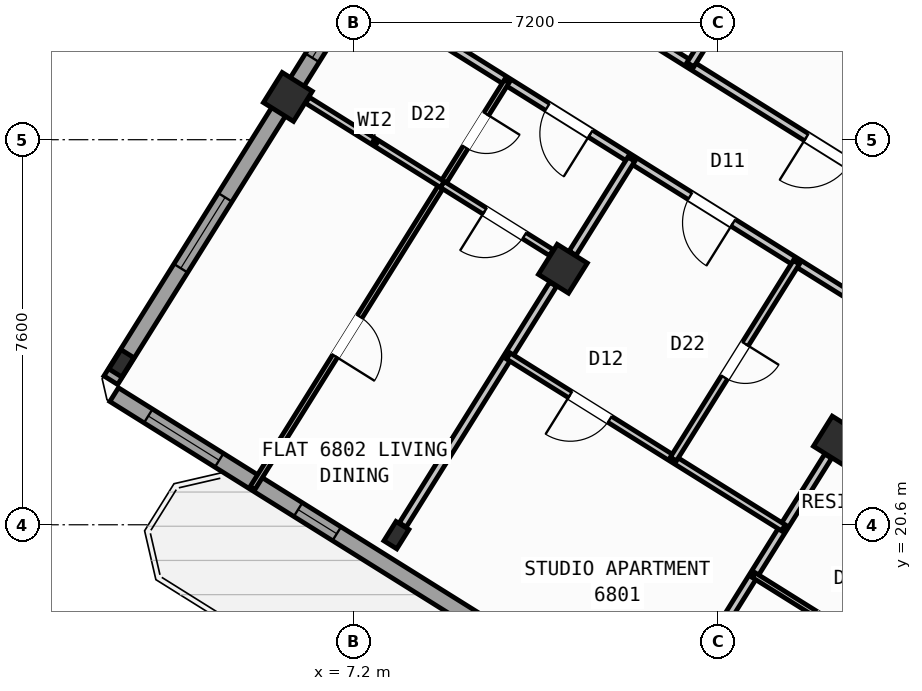
"""IFC4 building model, lengths in metres.
Left out: names, types, materials, properties, quantities, classifications, styles, units other than length and angle.
Written with IfcOpenShell. Run it as: python <this file> out.ifc"""

import sys

from ifc_helpers import new_model, si_unit, direction, frame, frame_2d, origin, origin_2d, place, context, subcontext, project, spatial, rectangle, hollow_rectangle, i_section, extrude, source, transform, mapped, element, fill, save


model = new_model("IFC4")
c1 = context("Model", 3, precision=1e-05, world=origin(), true_north=direction((0.0, 1.0)))
c2 = subcontext(c1, "Body", "Model", "MODEL_VIEW")
j1 = project(units=[si_unit("LENGTHUNIT", "METRE"), si_unit("PLANEANGLEUNIT", "RADIAN")], contexts=[c1])
p1 = place(None, origin())
s1 = spatial("IfcSite", under=j1, at=p1, CompositionType="ELEMENT")
p2 = place(p1, origin())
s2 = spatial("IfcBuilding", under=s1, at=p2, CompositionType="ELEMENT")
p3 = place(p2, frame((0.0, 0.0, 270.0)))
s3 = spatial("IfcBuildingStorey", under=s2, at=p3, CompositionType="ELEMENT", Elevation=270.0)
m1 = source(origin(), c2, "Body", "SweptSolid", [
    extrude(hollow_rectangle(XDim=0.7, YDim=0.7, WallThickness=0.028, at=origin_2d()), origin(), (0.0, 0.0, 1.0), 3.6),
])
for number, where, z_axis, x_axis in (
    (1, (16.764, 22.261, 0.0), (0.0, 0.0, 1.0), (-0.848, 0.53, 0.0)),
    (2, (11.336, 25.653, 0.0), (0.0, 0.0, 1.0), (-0.848, 0.53, 0.0)),
):
    element("IfcColumn", number, at=place(p3, frame(where, z_axis=z_axis, x_axis=x_axis)), inside=s3, PredefinedType="COLUMN", context=c2, shape_type="MappedRepresentation", body=[
        mapped(m1, transform((0.0, 0.0, 0.0), scale=1.0)),
    ])
m2 = source(origin(), c2, "Body", "SweptSolid", [
    extrude(i_section(OverallWidth=0.3, OverallDepth=0.45, WebThickness=0.014, FlangeThickness=0.026, at=origin_2d()), origin(), (0.0, 0.0, 1.0), 3.6),
])
p4 = place(p3, frame((8.051, 20.395, 0.0), z_axis=(0.0, 0.0, 1.0), x_axis=(-0.848048096156, 0.529919264233, 0.0)))
e3 = element("IfcColumn", 3, at=p4, inside=s3, PredefinedType="COLUMN", context=c2, shape_type="MappedRepresentation", body=[
    mapped(m2, transform((0.0, 0.0, 0.0), scale=1.0)),
])
p5 = place(p3, frame((5.909, 29.044, 0.0), z_axis=(0.0, 0.0, 1.0), x_axis=(-0.848048096156, 0.529919264233, 0.0)))
e4 = element("IfcColumn", 4, at=p5, inside=s3, PredefinedType="COLUMN", context=c2, shape_type="MappedRepresentation", body=[
    mapped(m1, transform((0.0, 0.0, 0.0), scale=1.0)),
])
p6 = place(p3, frame((2.623, 23.786, 0.0), z_axis=(0.0, 0.0, 1.0), x_axis=(-0.848048096156, 0.529919264233, 0.0)))
e5 = element("IfcColumn", 5, at=p6, inside=s3, PredefinedType="COLUMN", context=c2, shape_type="MappedRepresentation", body=[
    mapped(m2, transform((0.0, 0.0, 0.0), scale=1.0)),
])
p7 = place(p3, frame((29.268, 6.429, 0.0), z_axis=(0.0, 0.0, 1.0), x_axis=(-0.848049971435, 0.529916263149, 0.0)))
e6 = element("IfcWall", 6, at=p7, inside=s3, PredefinedType="STANDARD", context=c2, shape_type="SweptSolid", body=[
    extrude(rectangle(XDim=31.588, YDim=0.32, at=frame_2d((15.794, 0.0))), origin(), (0.0, 0.0, 1.0), 3.35),
])
p8 = place(p7, frame((16.362, 0.0, 0.0)))
e7 = element("IfcOpeningElement", 7, at=p8, cuts=e6, PredefinedType="OPENING", context=c2, shape_type="SweptSolid", body=[
    extrude(rectangle(XDim=1.2, YDim=2.15, at=frame_2d((0.6, 1.075))), frame((0.0, 0.17, 0.0), z_axis=(0.0, -1.0, 0.0), x_axis=(1.0, 0.0, 0.0)), (0.0, 0.0, 1.0), 0.34),
])
p9 = place(p7, frame((3.859, 0.0, 0.9)))
e8 = element("IfcOpeningElement", 8, at=p9, cuts=e6, PredefinedType="OPENING", context=c2, shape_type="SweptSolid", body=[
    extrude(rectangle(XDim=1.65, YDim=1.45, at=frame_2d((0.825, 0.725))), frame((0.0, 0.17, 0.0), z_axis=(0.0, -1.0, 0.0), x_axis=(1.0, 0.0, 0.0)), (0.0, 0.0, 1.0), 0.34),
])
p10 = place(p7, frame((10.519, 0.0, 0.9)))
e9 = element("IfcOpeningElement", 9, at=p10, cuts=e6, PredefinedType="OPENING", context=c2, shape_type="SweptSolid", body=[
    extrude(rectangle(XDim=1.65, YDim=1.45, at=frame_2d((0.825, 0.725))), frame((0.0, 0.17, 0.0), z_axis=(0.0, -1.0, 0.0), x_axis=(1.0, 0.0, 0.0)), (0.0, 0.0, 1.0), 0.34),
])
p11 = place(p7, frame((21.219, 0.0, 0.95)))
e10 = element("IfcOpeningElement", 10, at=p11, cuts=e6, PredefinedType="OPENING", context=c2, shape_type="SweptSolid", body=[
    extrude(rectangle(XDim=1.95, YDim=1.35, at=frame_2d((0.975, 0.675))), frame((0.0, 0.17, 0.0), z_axis=(0.0, -1.0, 0.0), x_axis=(1.0, 0.0, 0.0)), (0.0, 0.0, 1.0), 0.34),
])
p12 = place(p7, frame((26.406, 0.0, 1.0)))
e11 = element("IfcOpeningElement", 11, at=p12, cuts=e6, PredefinedType="OPENING", context=c2, shape_type="SweptSolid", body=[
    extrude(rectangle(XDim=0.9, YDim=1.25, at=frame_2d((0.45, 0.625))), frame((0.0, 0.17, 0.0), z_axis=(0.0, -1.0, 0.0), x_axis=(1.0, 0.0, 0.0)), (0.0, 0.0, 1.0), 0.34),
])
p13 = place(p7, frame((29.143, 0.0, 0.9)))
e12 = element("IfcOpeningElement", 12, at=p13, cuts=e6, PredefinedType="OPENING", context=c2, shape_type="SweptSolid", body=[
    extrude(rectangle(XDim=1.65, YDim=1.45, at=frame_2d((0.825, 0.725))), frame((0.0, 0.17, 0.0), z_axis=(0.0, -1.0, 0.0), x_axis=(1.0, 0.0, 0.0)), (0.0, 0.0, 1.0), 0.34),
])
p14 = place(p3, frame((2.415, 23.452, 0.0), z_axis=(0.0, 0.0, 1.0), x_axis=(0.52991049553, 0.848053575387, 0.0)))
e13 = element("IfcWall", 13, at=p14, inside=s3, PredefinedType="STANDARD", context=c2, shape_type="SweptSolid", body=[
    extrude(rectangle(XDim=21.587, YDim=0.32, at=frame_2d((10.794, 0.0))), origin(), (0.0, 0.0, 1.0), 2.875),
])
p15 = place(p14, frame((2.606, 0.0, 0.9)))
e14 = element("IfcOpeningElement", 14, at=p15, cuts=e13, PredefinedType="OPENING", context=c2, shape_type="SweptSolid", body=[
    extrude(rectangle(XDim=1.65, YDim=1.45, at=frame_2d((0.825, 0.725))), frame((0.0, 0.17, 0.0), z_axis=(0.0, -1.0, 0.0), x_axis=(1.0, 0.0, 0.0)), (0.0, 0.0, 1.0), 0.34),
])
p16 = place(p14, frame((7.504, 0.0, 1.0)))
e15 = element("IfcOpeningElement", 15, at=p16, cuts=e13, PredefinedType="OPENING", context=c2, shape_type="SweptSolid", body=[
    extrude(rectangle(XDim=0.9, YDim=1.25, at=frame_2d((0.45, 0.625))), frame((0.0, 0.17, 0.0), z_axis=(0.0, -1.0, 0.0), x_axis=(1.0, 0.0, 0.0)), (0.0, 0.0, 1.0), 0.34),
])
p17 = place(p14, frame((12.084, 0.0, 1.0)))
e16 = element("IfcOpeningElement", 16, at=p17, cuts=e13, PredefinedType="OPENING", context=c2, shape_type="SweptSolid", body=[
    extrude(rectangle(XDim=0.9, YDim=1.25, at=frame_2d((0.45, 0.625))), frame((0.0, 0.17, 0.0), z_axis=(0.0, -1.0, 0.0), x_axis=(1.0, 0.0, 0.0)), (0.0, 0.0, 1.0), 0.34),
])
p18 = place(p14, frame((15.619, 0.0, 1.0)))
e17 = element("IfcOpeningElement", 17, at=p18, cuts=e13, PredefinedType="OPENING", context=c2, shape_type="SweptSolid", body=[
    extrude(rectangle(XDim=0.9, YDim=1.25, at=frame_2d((0.45, 0.625))), frame((0.0, 0.17, 0.0), z_axis=(0.0, -1.0, 0.0), x_axis=(1.0, 0.0, 0.0)), (0.0, 0.0, 1.0), 0.34),
])
p19 = place(p14, frame((18.569, 0.0, 1.0)))
e18 = element("IfcOpeningElement", 18, at=p19, cuts=e13, PredefinedType="OPENING", context=c2, shape_type="SweptSolid", body=[
    extrude(rectangle(XDim=0.9, YDim=1.25, at=frame_2d((0.45, 0.625))), frame((0.0, 0.17, 0.0), z_axis=(0.0, -1.0, 0.0), x_axis=(1.0, 0.0, 0.0)), (0.0, 0.0, 1.0), 0.34),
])
p20 = place(p3, frame((14.138, 41.825, 0.0), z_axis=(0.0, 0.0, 1.0), x_axis=(0.848046498049, -0.529921821731, 0.0)))
e19 = element("IfcWall", 19, at=p20, inside=s3, PredefinedType="STANDARD", context=c2, shape_type="SweptSolid", body=[
    extrude(rectangle(XDim=31.588, YDim=0.32, at=frame_2d((15.794, 0.0))), origin(), (0.0, 0.0, 1.0), 3.35),
])
p21 = place(p20, frame((3.46, 0.0, 0.0)))
e20 = element("IfcOpeningElement", 20, at=p21, cuts=e19, PredefinedType="OPENING", context=c2, shape_type="SweptSolid", body=[
    extrude(rectangle(XDim=1.05, YDim=2.15, at=frame_2d((0.525, 1.075))), frame((0.0, 0.17, 0.0), z_axis=(0.0, -1.0, 0.0), x_axis=(1.0, 0.0, 0.0)), (0.0, 0.0, 1.0), 0.34),
])
p22 = place(p20, frame((0.831, 0.0, 1.0)))
e21 = element("IfcOpeningElement", 21, at=p22, cuts=e19, PredefinedType="OPENING", context=c2, shape_type="SweptSolid", body=[
    extrude(rectangle(XDim=0.9, YDim=1.25, at=frame_2d((0.45, 0.625))), frame((0.0, 0.17, 0.0), z_axis=(0.0, -1.0, 0.0), x_axis=(1.0, 0.0, 0.0)), (0.0, 0.0, 1.0), 0.34),
])
p23 = place(p20, frame((8.719, 0.0, 0.9)))
e22 = element("IfcOpeningElement", 22, at=p23, cuts=e19, PredefinedType="OPENING", context=c2, shape_type="SweptSolid", body=[
    extrude(rectangle(XDim=1.35, YDim=1.45, at=frame_2d((0.675, 0.725))), frame((0.0, 0.17, 0.0), z_axis=(0.0, -1.0, 0.0), x_axis=(1.0, 0.0, 0.0)), (0.0, 0.0, 1.0), 0.34),
])
p24 = place(p20, frame((13.599, 0.0, 0.95)))
e23 = element("IfcOpeningElement", 23, at=p24, cuts=e19, PredefinedType="OPENING", context=c2, shape_type="SweptSolid", body=[
    extrude(rectangle(XDim=1.95, YDim=1.35, at=frame_2d((0.975, 0.675))), frame((0.0, 0.17, 0.0), z_axis=(0.0, -1.0, 0.0), x_axis=(1.0, 0.0, 0.0)), (0.0, 0.0, 1.0), 0.34),
])
p25 = place(p20, frame((17.154, 0.0, 1.0)))
e24 = element("IfcOpeningElement", 24, at=p25, cuts=e19, PredefinedType="OPENING", context=c2, shape_type="SweptSolid", body=[
    extrude(rectangle(XDim=0.9, YDim=1.25, at=frame_2d((0.45, 0.625))), frame((0.0, 0.17, 0.0), z_axis=(0.0, -1.0, 0.0), x_axis=(1.0, 0.0, 0.0)), (0.0, 0.0, 1.0), 0.34),
])
p26 = place(p20, frame((21.719, 0.0, 0.9)))
e25 = element("IfcOpeningElement", 25, at=p26, cuts=e19, PredefinedType="OPENING", context=c2, shape_type="SweptSolid", body=[
    extrude(rectangle(XDim=1.65, YDim=1.45, at=frame_2d((0.825, 0.725))), frame((0.0, 0.17, 0.0), z_axis=(0.0, -1.0, 0.0), x_axis=(1.0, 0.0, 0.0)), (0.0, 0.0, 1.0), 0.34),
])
p27 = place(p20, frame((27.419, 0.0, 0.9)))
e26 = element("IfcOpeningElement", 26, at=p27, cuts=e19, PredefinedType="OPENING", context=c2, shape_type="SweptSolid", body=[
    extrude(rectangle(XDim=1.65, YDim=1.45, at=frame_2d((0.825, 0.725))), frame((0.0, 0.17, 0.0), z_axis=(0.0, -1.0, 0.0), x_axis=(1.0, 0.0, 0.0)), (0.0, 0.0, 1.0), 0.34),
])
p28 = place(p3, frame((21.329, 22.416, 0.0), z_axis=(0.0, 0.0, 1.0), x_axis=(-0.529920220799, -0.848047498427, 0.0)))
e27 = element("IfcWall", 27, at=p28, inside=s3, PredefinedType="PARTITIONING", context=c2, shape_type="SweptSolid", body=[
    extrude(rectangle(XDim=9.2, YDim=0.16, at=frame_2d((4.6, 0.0))), origin(), (0.0, 0.0, 1.0), 3.34),
])
p29 = place(p3, frame((22.495, 24.281, 0.0), z_axis=(0.0, 0.0, 1.0), x_axis=(-0.848052408131, 0.529912363569, 0.0)))
e28 = element("IfcWall", 28, at=p29, inside=s3, PredefinedType="PARTITIONING", context=c2, shape_type="SweptSolid", body=[
    extrude(rectangle(XDim=16.73, YDim=0.16, at=frame_2d((8.365, 0.0))), origin(), (0.0, 0.0, 1.0), 3.34),
])
p30 = place(p29, frame((2.22, 0.0, 0.0)))
e29 = element("IfcOpeningElement", 29, at=p30, cuts=e28, PredefinedType="OPENING", context=c2, shape_type="SweptSolid", body=[
    extrude(rectangle(XDim=0.86, YDim=2.05, at=frame_2d((0.43, 1.025))), frame((0.0, 0.09, 0.0), z_axis=(0.0, -1.0, 0.0), x_axis=(1.0, 0.0, 0.0)), (0.0, 0.0, 1.0), 0.18),
])
p31 = place(p29, frame((6.49, 0.0, 0.0)))
e30 = element("IfcOpeningElement", 30, at=p31, cuts=e28, PredefinedType="OPENING", context=c2, shape_type="SweptSolid", body=[
    extrude(rectangle(XDim=1.0, YDim=2.1, at=frame_2d((0.5, 1.05))), frame((0.0, 0.09, 0.0), z_axis=(0.0, -1.0, 0.0), x_axis=(1.0, 0.0, 0.0)), (0.0, 0.0, 1.0), 0.18),
])
p32 = place(p29, frame((14.76, 0.0, 0.0)))
e31 = element("IfcOpeningElement", 31, at=p32, cuts=e28, PredefinedType="OPENING", context=c2, shape_type="SweptSolid", body=[
    extrude(rectangle(XDim=1.0, YDim=2.1, at=frame_2d((0.5, 1.05))), frame((0.0, 0.09, 0.0), z_axis=(0.0, -1.0, 0.0), x_axis=(1.0, 0.0, 0.0)), (0.0, 0.0, 1.0), 0.18),
])
p33 = place(p3, frame((21.329, 22.416, 0.0), z_axis=(0.0, 0.0, 1.0), x_axis=(-0.848052408131, 0.529912363569, 0.0)))
e32 = element("IfcWall", 32, at=p33, inside=s3, PredefinedType="PARTITIONING", context=c2, shape_type="SweptSolid", body=[
    extrude(rectangle(XDim=16.73, YDim=0.16, at=frame_2d((8.365, 0.0))), origin(), (0.0, 0.0, 1.0), 3.34),
])
p34 = place(p33, frame((1.395, 0.0, 0.0)))
e33 = element("IfcOpeningElement", 33, at=p34, cuts=e32, PredefinedType="OPENING", context=c2, shape_type="SweptSolid", body=[
    extrude(rectangle(XDim=1.0, YDim=2.1, at=frame_2d((0.5, 1.05))), frame((0.0, 0.09, 0.0), z_axis=(0.0, -1.0, 0.0), x_axis=(1.0, 0.0, 0.0)), (0.0, 0.0, 1.0), 0.18),
])
p35 = place(p33, frame((7.82, 0.0, 0.0)))
e34 = element("IfcOpeningElement", 34, at=p35, cuts=e32, PredefinedType="OPENING", context=c2, shape_type="SweptSolid", body=[
    extrude(rectangle(XDim=1.0, YDim=2.1, at=frame_2d((0.5, 1.05))), frame((0.0, 0.09, 0.0), z_axis=(0.0, -1.0, 0.0), x_axis=(1.0, 0.0, 0.0)), (0.0, 0.0, 1.0), 0.18),
])
p36 = place(p33, frame((11.14, 0.0, 0.0)))
e35 = element("IfcOpeningElement", 35, at=p36, cuts=e32, PredefinedType="OPENING", context=c2, shape_type="SweptSolid", body=[
    extrude(rectangle(XDim=1.0, YDim=2.1, at=frame_2d((0.5, 1.05))), frame((0.0, 0.09, 0.0), z_axis=(0.0, -1.0, 0.0), x_axis=(1.0, 0.0, 0.0)), (0.0, 0.0, 1.0), 0.18),
])
p37 = place(p3, frame((16.572, 21.954, 0.0), z_axis=(0.0, 0.0, 1.0), x_axis=(-0.529904903214, -0.848057069748, 0.0)))
e36 = element("IfcWall", 36, at=p37, inside=s3, PredefinedType="PARTITIONING", context=c2, shape_type="SweptSolid", body=[
    extrude(rectangle(XDim=5.601, YDim=0.16, at=frame_2d((2.801, 0.0))), origin(), (0.0, 0.0, 1.0), 2.875),
])
p38 = place(p3, frame((18.318, 17.597, 0.0), z_axis=(0.0, 0.0, 1.0), x_axis=(-0.848059820872, 0.529900500304, 0.0)))
e37 = element("IfcWall", 37, at=p38, inside=s3, PredefinedType="PARTITIONING", context=c2, shape_type="SweptSolid", body=[
    extrude(rectangle(XDim=3.79, YDim=0.11, at=frame_2d((1.895, 0.0))), origin(), (0.0, 0.0, 1.0), 3.34),
])
p39 = place(p38, frame((1.435, 0.0, 0.0)))
e38 = element("IfcOpeningElement", 38, at=p39, cuts=e37, PredefinedType="OPENING", context=c2, shape_type="SweptSolid", body=[
    extrude(rectangle(XDim=0.92, YDim=2.08, at=frame_2d((0.46, 1.04))), frame((0.0, 0.065, 0.0), z_axis=(0.0, -1.0, 0.0), x_axis=(1.0, 0.0, 0.0)), (0.0, 0.0, 1.0), 0.13),
])
p40 = place(p3, frame((12.688, 27.815, 0.0), z_axis=(0.0, 0.0, 1.0), x_axis=(-0.52994879608, -0.848029641896, 0.0)))
e39 = element("IfcWall", 39, at=p40, inside=s3, PredefinedType="PARTITIONING", context=c2, shape_type="SweptSolid", body=[
    extrude(rectangle(XDim=2.188, YDim=0.16, at=frame_2d((1.094, 0.0))), origin(), (0.0, 0.0, 1.0), 2.875),
])
p41 = place(p3, frame((11.144, 25.346, 0.0), z_axis=(0.0, 0.0, 1.0), x_axis=(-0.529904903214, -0.848057069748, 0.0)))
e40 = element("IfcWall", 40, at=p41, inside=s3, PredefinedType="PARTITIONING", context=c2, shape_type="SweptSolid", body=[
    extrude(rectangle(XDim=5.601, YDim=0.16, at=frame_2d((2.801, 0.0))), origin(), (0.0, 0.0, 1.0), 2.875),
])
p42 = place(p3, frame((15.688, 20.54, 0.0), z_axis=(0.0, 0.0, 1.0), x_axis=(-0.848049732085, 0.529916646191, 0.0)))
e41 = element("IfcWall", 41, at=p42, inside=s3, PredefinedType="PLUMBINGWALL", context=c2, shape_type="SweptSolid", body=[
    extrude(rectangle(XDim=6.4, YDim=0.14, at=frame_2d((3.2, 0.0))), origin(), (0.0, 0.0, 1.0), 3.34),
])
p43 = place(p42, frame((4.04, 0.0, 0.0)))
e42 = element("IfcOpeningElement", 42, at=p43, cuts=e41, PredefinedType="OPENING", context=c2, shape_type="SweptSolid", body=[
    extrude(rectangle(XDim=0.92, YDim=2.08, at=frame_2d((0.46, 1.04))), frame((0.0, 0.08, 0.0), z_axis=(0.0, -1.0, 0.0), x_axis=(1.0, 0.0, 0.0)), (0.0, 0.0, 1.0), 0.16),
])
p44 = place(p3, frame((15.944, 25.781, 0.0), z_axis=(0.0, 0.0, 1.0), x_axis=(-0.529917480809, -0.848049210561, 0.0)))
e43 = element("IfcWall", 43, at=p44, inside=s3, PredefinedType="PLUMBINGWALL", context=c2, shape_type="SweptSolid", body=[
    extrude(rectangle(XDim=4.58, YDim=0.14, at=frame_2d((2.29, 0.0))), origin(), (0.0, 0.0, 1.0), 3.34),
])
p45 = place(p44, frame((1.9, 0.0, 0.0)))
e44 = element("IfcOpeningElement", 44, at=p45, cuts=e43, PredefinedType="OPENING", context=c2, shape_type="SweptSolid", body=[
    extrude(rectangle(XDim=0.78, YDim=2.05, at=frame_2d((0.39, 1.025))), frame((0.0, 0.08, 0.0), z_axis=(0.0, -1.0, 0.0), x_axis=(1.0, 0.0, 0.0)), (0.0, 0.0, 1.0), 0.16),
])
p46 = place(p3, frame((10.228, 29.352, 0.0), z_axis=(0.0, 0.0, 1.0), x_axis=(-0.529917830441, -0.848048992088, 0.0)))
e45 = element("IfcWall", 45, at=p46, inside=s3, PredefinedType="PARTITIONING", context=c2, shape_type="SweptSolid", body=[
    extrude(rectangle(XDim=9.47, YDim=0.11, at=frame_2d((4.735, 0.0))), origin(), (0.0, 0.0, 1.0), 3.34),
])
p47 = place(p46, frame((0.76, 0.0, 0.0)))
e46 = element("IfcOpeningElement", 46, at=p47, cuts=e45, PredefinedType="OPENING", context=c2, shape_type="SweptSolid", body=[
    extrude(rectangle(XDim=0.78, YDim=2.05, at=frame_2d((0.39, 1.025))), frame((0.0, 0.065, 0.0), z_axis=(0.0, -1.0, 0.0), x_axis=(1.0, 0.0, 0.0)), (0.0, 0.0, 1.0), 0.13),
])
p48 = place(p46, frame((5.475, 0.0, 0.0)))
e47 = element("IfcOpeningElement", 47, at=p48, cuts=e45, PredefinedType="OPENING", context=c2, shape_type="SweptSolid", body=[
    extrude(rectangle(XDim=0.92, YDim=2.08, at=frame_2d((0.46, 1.04))), frame((0.0, 0.065, 0.0), z_axis=(0.0, -1.0, 0.0), x_axis=(1.0, 0.0, 0.0)), (0.0, 0.0, 1.0), 0.13),
])
p49 = place(p3, frame((11.109, 25.972, 0.0), z_axis=(0.0, 0.0, 1.0), x_axis=(-0.848041534199, 0.529929765415, 0.0)))
e48 = element("IfcWall", 48, at=p49, inside=s3, PredefinedType="PLUMBINGWALL", context=c2, shape_type="SweptSolid", body=[
    extrude(rectangle(XDim=2.538, YDim=0.14, at=frame_2d((1.269, 0.0))), origin(), (0.0, 0.0, 1.0), 2.875),
])
p50 = place(p49, frame((0.628, 0.0, 0.0)))
e49 = element("IfcOpeningElement", 49, at=p50, cuts=e48, PredefinedType="OPENING", context=c2, shape_type="SweptSolid", body=[
    extrude(rectangle(XDim=0.92, YDim=2.08, at=frame_2d((0.46, 1.04))), frame((0.0, 0.08, 0.0), z_axis=(0.0, -1.0, 0.0), x_axis=(1.0, 0.0, 0.0)), (0.0, 0.0, 1.0), 0.16),
])
p51 = place(p3, frame((8.956, 27.317, 0.0), z_axis=(0.0, 0.0, 1.0), x_axis=(-0.848050751193, 0.529915015264, 0.0)))
e50 = element("IfcWall", 50, at=p51, inside=s3, PredefinedType="PLUMBINGWALL", context=c2, shape_type="SweptSolid", body=[
    extrude(rectangle(XDim=3.138, YDim=0.14, at=frame_2d((1.569, 0.0))), origin(), (0.0, 0.0, 1.0), 2.875),
])
p52 = place(p3, frame((15.013, 31.537, 0.0), z_axis=(0.0, 0.0, 1.0), x_axis=(-0.5299186965, -0.848048450915, 0.0)))
e51 = element("IfcWall", 51, at=p52, inside=s3, PredefinedType="PARTITIONING", context=c2, shape_type="SweptSolid", body=[
    extrude(rectangle(XDim=2.188, YDim=0.16, at=frame_2d((1.094, 0.0))), origin(), (0.0, 0.0, 1.0), 2.875),
])
m3 = source(origin(), c2, "Body", "SweptSolid", [
    extrude(rectangle(XDim=0.9, YDim=1.25, at=frame_2d((0.45, 0.625))), frame((0.0, 0.03, 0.0), z_axis=(0.0, -1.0, 0.0), x_axis=(1.0, 0.0, 0.0)), (0.0, 0.0, 1.0), 0.06),
])
p53 = place(p12, origin())
e52 = element("IfcWindow", 52, at=p53, inside=s3, PartitioningType="SINGLE_PANEL", PredefinedType="WINDOW", context=c2, shape_type="MappedRepresentation", body=[
    mapped(m3, transform((0.0, 0.0, 0.0), scale=1.0)),
])
fill(e11, e52)
m4 = source(origin(), c2, "Body", "SweptSolid", [
    extrude(rectangle(XDim=1.65, YDim=1.45, at=frame_2d((0.825, 0.725))), frame((0.0, 0.03, 0.0), z_axis=(0.0, -1.0, 0.0), x_axis=(1.0, 0.0, 0.0)), (0.0, 0.0, 1.0), 0.06),
])
p54 = place(p13, origin())
e53 = element("IfcWindow", 53, at=p54, inside=s3, PartitioningType="SINGLE_PANEL", PredefinedType="WINDOW", context=c2, shape_type="MappedRepresentation", body=[
    mapped(m4, transform((0.0, 0.0, 0.0), scale=1.0)),
])
fill(e12, e53)
p55 = place(p15, origin())
e54 = element("IfcWindow", 54, at=p55, inside=s3, PartitioningType="SINGLE_PANEL", PredefinedType="WINDOW", context=c2, shape_type="MappedRepresentation", body=[
    mapped(m4, transform((0.0, 0.0, 0.0), scale=1.0)),
])
fill(e14, e54)
p56 = place(p16, origin())
e55 = element("IfcWindow", 55, at=p56, inside=s3, PartitioningType="SINGLE_PANEL", PredefinedType="WINDOW", context=c2, shape_type="MappedRepresentation", body=[
    mapped(m3, transform((0.0, 0.0, 0.0), scale=1.0)),
])
fill(e15, e55)
m5 = source(origin(), c2, "Body", "SweptSolid", [
    extrude(rectangle(XDim=1.0, YDim=2.1, at=frame_2d((0.5, 1.05))), frame((0.0, 0.025, 0.0), z_axis=(0.0, -1.0, 0.0), x_axis=(1.0, 0.0, 0.0)), (0.0, 0.0, 1.0), 0.05),
])
p57 = place(p35, origin())
e56 = element("IfcDoor", 56, at=p57, inside=s3, OperationType="SINGLE_SWING_LEFT", PredefinedType="DOOR", context=c2, shape_type="MappedRepresentation", body=[
    mapped(m5, transform((0.0, 0.0, 0.0), scale=1.0)),
])
fill(e34, e56)
m6 = source(origin(), c2, "Body", "SweptSolid", [
    extrude(rectangle(XDim=0.92, YDim=2.08, at=frame_2d((0.46, 1.04))), frame((0.0, 0.025, 0.0), z_axis=(0.0, -1.0, 0.0), x_axis=(1.0, 0.0, 0.0)), (0.0, 0.0, 1.0), 0.05),
])
p58 = place(p43, origin())
e57 = element("IfcDoor", 57, at=p58, inside=s3, OperationType="SINGLE_SWING_RIGHT", PredefinedType="DOOR", context=c2, shape_type="MappedRepresentation", body=[
    mapped(m6, transform((0.0, 0.0, 0.0), scale=1.0)),
])
fill(e42, e57)
m7 = source(origin(), c2, "Body", "SweptSolid", [
    extrude(rectangle(XDim=0.78, YDim=2.05, at=frame_2d((0.39, 1.025))), frame((0.0, 0.025, 0.0), z_axis=(0.0, -1.0, 0.0), x_axis=(1.0, 0.0, 0.0)), (0.0, 0.0, 1.0), 0.05),
])
p59 = place(p45, origin())
e58 = element("IfcDoor", 58, at=p59, inside=s3, OperationType="SINGLE_SWING_LEFT", PredefinedType="DOOR", context=c2, shape_type="MappedRepresentation", body=[
    mapped(m7, transform((0.0, 0.0, 0.0), scale=1.0)),
])
fill(e44, e58)
p60 = place(p36, origin())
e59 = element("IfcDoor", 59, at=p60, inside=s3, OperationType="SINGLE_SWING_LEFT", PredefinedType="DOOR", context=c2, shape_type="MappedRepresentation", body=[
    mapped(m5, transform((0.0, 0.0, 0.0), scale=1.0)),
])
fill(e35, e59)
p61 = place(p50, origin())
e60 = element("IfcDoor", 60, at=p61, inside=s3, OperationType="SINGLE_SWING_RIGHT", PredefinedType="DOOR", context=c2, shape_type="MappedRepresentation", body=[
    mapped(m6, transform((0.0, 0.0, 0.0), scale=1.0)),
])
fill(e49, e60)
p62 = place(p47, origin())
e61 = element("IfcDoor", 61, at=p62, inside=s3, OperationType="SINGLE_SWING_LEFT", PredefinedType="DOOR", context=c2, shape_type="MappedRepresentation", body=[
    mapped(m7, transform((0.0, 0.0, 0.0), scale=1.0)),
])
fill(e46, e61)
p63 = place(p48, origin())
e62 = element("IfcDoor", 62, at=p63, inside=s3, OperationType="SINGLE_SWING_RIGHT", PredefinedType="DOOR", context=c2, shape_type="MappedRepresentation", body=[
    mapped(m6, transform((0.0, 0.0, 0.0), scale=1.0)),
])
fill(e47, e62)
p64 = place(p31, origin())
e63 = element("IfcDoor", 63, at=p64, inside=s3, OperationType="SINGLE_SWING_RIGHT", PredefinedType="DOOR", context=c2, shape_type="MappedRepresentation", body=[
    mapped(m5, transform((0.0, 0.0, 0.0), scale=1.0)),
])
fill(e30, e63)
save(model, sys.argv[1])
